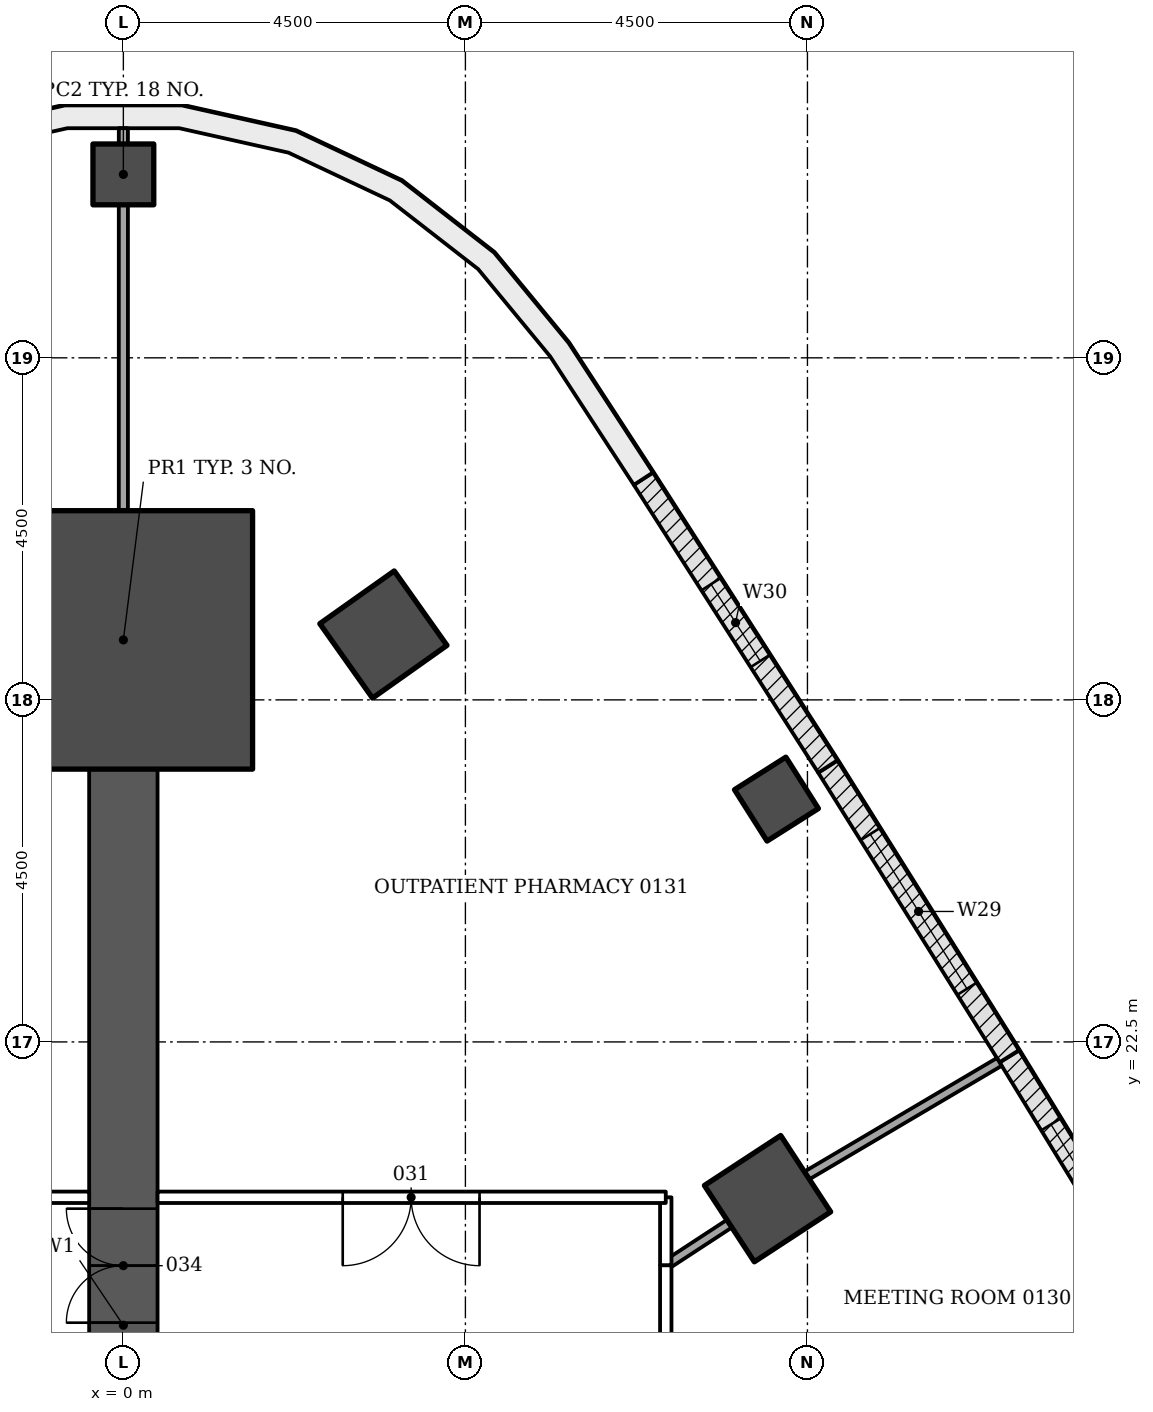
"""IFC4 building model, lengths in metres.
Left out: names, types, materials, properties, quantities, classifications, styles, units other than length and angle.
Written with IfcOpenShell. Run it as: python <this file> out.ifc"""

import sys

from ifc_helpers import new_model, si_unit, direction, frame, frame_2d, origin, origin_2d, place, context, subcontext, project, spatial, polyline, rectangle, outline, extrude, element, fill, save


model = new_model("IFC4")
c1 = context("Model", 3, precision=1e-05, world=origin(), true_north=direction((0.0, 1.0)))
c2 = subcontext(c1, "Body", "Model", "MODEL_VIEW")
j1 = project(units=[si_unit("LENGTHUNIT", "METRE"), si_unit("PLANEANGLEUNIT", "RADIAN")], contexts=[c1])
p1 = place(None, origin())
s1 = spatial("IfcSite", under=j1, at=p1, CompositionType="ELEMENT")
p2 = place(p1, origin())
s2 = spatial("IfcBuilding", under=s1, at=p2, CompositionType="ELEMENT")
p3 = place(p2, frame((0.0, 0.0, 6.0)))
s3 = spatial("IfcBuildingStorey", under=s2, at=p3, CompositionType="ELEMENT", Elevation=6.0)
for number, where, z_axis, x_axis in (
    (1, (8.475, 20.438, -0.25), (0.0, 0.0, 1.0), (0.837, 0.547, 0.0)),
    (2, (3.421, 27.86, -0.25), (0.0, 0.0, 1.0), (0.816, 0.578, 0.0)),
):
    element("IfcColumn", number, at=place(p3, frame(where, z_axis=z_axis, x_axis=x_axis)), inside=s3, PredefinedType="COLUMN", context=c2, shape_type="SweptSolid", body=[
        extrude(rectangle(XDim=1.2, YDim=1.2, at=origin_2d()), origin(), (0.0, 0.0, 1.0), 4.5),
    ])
for number, where, z_axis, x_axis in (
    (3, (0.0, 33.913, -0.25), (0.0, 0.0, 1.0), (0.0, 1.0, 0.0)),
    (4, (8.592, 25.695, -0.25), (0.0, 0.0, 1.0), (0.845, 0.535, 0.0)),
):
    element("IfcColumn", number, at=place(p3, frame(where, z_axis=z_axis, x_axis=x_axis)), inside=s3, PredefinedType="COLUMN", context=c2, shape_type="SweptSolid", body=[
        extrude(rectangle(XDim=0.8, YDim=0.8, at=origin_2d()), origin(), (0.0, 0.0, 1.0), 4.5),
    ])
p4 = place(p3, frame((0.0, 11.456, -0.25), z_axis=(0.0, 0.0, 1.0), x_axis=(0.0, 1.0, 0.0)))
e5 = element("IfcWall", 5, at=p4, inside=s3, PredefinedType="SHEAR", context=c2, shape_type="SweptSolid", body=[
    extrude(rectangle(XDim=14.633, YDim=0.9, at=frame_2d((7.316, 0.0))), origin(), (0.0, 0.0, 1.0), 4.5),
])
p5 = place(p4, frame((7.35, 0.0, 0.25)))
e6 = element("IfcOpeningElement", 6, at=p5, cuts=e5, PredefinedType="OPENING", context=c2, shape_type="SweptSolid", body=[
    extrude(rectangle(XDim=1.5, YDim=2.1, at=frame_2d((0.75, 1.05))), frame((0.0, 0.46, 0.0), z_axis=(0.0, -1.0, 0.0), x_axis=(1.0, 0.0, 0.0)), (0.0, 0.0, 1.0), 0.92),
])
p6 = place(p3, frame((0.0, 27.789, -0.25), z_axis=(0.0, 0.0, 1.0), x_axis=(0.0, 1.0, 0.0)))
e7 = element("IfcColumn", 7, at=p6, inside=s3, PredefinedType="COLUMN", context=c2, shape_type="SweptSolid", body=[
    extrude(rectangle(XDim=3.4, YDim=3.4, at=origin_2d()), origin(), (0.0, 0.0, 1.0), 4.5),
])
p7 = place(p3, frame((11.656, 22.309, 0.0), z_axis=(0.0, 0.0, 1.0), x_axis=(0.522078085402, -0.852897691838, 0.0)))
e8 = element("IfcWall", 8, at=p7, inside=s3, PredefinedType="NOTDEFINED", context=c2, shape_type="SweptSolid", body=[
    extrude(rectangle(XDim=4.496, YDim=0.3, at=frame_2d((2.248, 0.0))), origin(), (0.0, 0.0, 1.0), 4.25),
])
p8 = place(p7, frame((1.048, 0.0, 0.9)))
e9 = element("IfcOpeningElement", 9, at=p8, cuts=e8, PredefinedType="OPENING", context=c2, shape_type="SweptSolid", body=[
    extrude(rectangle(XDim=2.4, YDim=2.4, at=frame_2d((1.2, 1.2))), frame((0.0, 0.16, 0.0), z_axis=(0.0, -1.0, 0.0), x_axis=(1.0, 0.0, 0.0)), (0.0, 0.0, 1.0), 0.32),
])
p9 = place(p3, frame((9.269, 26.122, 0.0), z_axis=(0.0, 0.0, 1.0), x_axis=(0.530804082031, -0.847494558389, 0.0)))
e10 = element("IfcWall", 10, at=p9, inside=s3, PredefinedType="NOTDEFINED", context=c2, shape_type="SweptSolid", body=[
    extrude(rectangle(XDim=4.496, YDim=0.3, at=frame_2d((2.248, 0.0))), origin(), (0.0, 0.0, 1.0), 4.25),
])
p10 = place(p9, frame((1.048, 0.0, 0.9)))
e11 = element("IfcOpeningElement", 11, at=p10, cuts=e10, PredefinedType="OPENING", context=c2, shape_type="SweptSolid", body=[
    extrude(rectangle(XDim=2.4, YDim=2.4, at=frame_2d((1.2, 1.2))), frame((0.0, 0.16, 0.0), z_axis=(0.0, -1.0, 0.0), x_axis=(1.0, 0.0, 0.0)), (0.0, 0.0, 1.0), 0.32),
])
p11 = place(p3, frame((6.842, 29.909, 0.0), z_axis=(0.0, 0.0, 1.0), x_axis=(0.539483537275, -0.841996147859, 0.0)))
e12 = element("IfcWall", 12, at=p11, inside=s3, PredefinedType="NOTDEFINED", context=c2, shape_type="SweptSolid", body=[
    extrude(rectangle(XDim=4.496, YDim=0.3, at=frame_2d((2.248, 0.0))), origin(), (0.0, 0.0, 1.0), 4.25),
])
p12 = place(p11, frame((1.648, 0.0, 0.8)))
e13 = element("IfcOpeningElement", 13, at=p12, cuts=e12, PredefinedType="OPENING", context=c2, shape_type="SweptSolid", body=[
    extrude(rectangle(XDim=1.2, YDim=3.0, at=frame_2d((0.6, 1.5))), frame((0.0, 0.16, 0.0), z_axis=(0.0, -1.0, 0.0), x_axis=(1.0, 0.0, 0.0)), (0.0, 0.0, 1.0), 0.32),
])
p13 = place(p3, origin())
e14 = element("IfcWall", 14, at=p13, inside=s3, PredefinedType="NOTDEFINED", context=c2, shape_type="SweptSolid", body=[
    extrude(outline(polyline([(6.967, 29.992), (5.857, 31.697), (4.878, 32.884), (3.663, 33.828), (2.271, 34.485), (0.769, 34.821), (-0.769, 34.821), (-2.271, 34.485), (-3.663, 33.828), (-4.878, 32.884), (-5.857, 31.697), (-6.967, 29.992), (-6.716, 29.828), (-5.615, 31.519), (-4.667, 32.667), (-3.505, 33.571), (-2.173, 34.199), (-0.736, 34.521), (0.736, 34.521), (2.173, 34.199), (3.505, 33.571), (4.667, 32.667), (5.615, 31.519), (6.716, 29.828), (6.967, 29.992)])), origin(), (0.0, 0.0, 1.0), 4.25),
])
p14 = place(p3, frame((7.136, 14.297, 0.0), z_axis=(0.0, 0.0, 1.0), x_axis=(0.0, 1.0, 0.0)))
e15 = element("IfcWall", 15, at=p14, inside=s3, PredefinedType="PARTITIONING", context=c2, shape_type="SweptSolid", body=[
    extrude(rectangle(XDim=5.265, YDim=0.15, at=frame_2d((2.632, 0.0))), origin(), (0.0, 0.0, 1.0), 3.638),
])
p15 = place(p14, frame((2.15, 0.0, 0.0)))
e16 = element("IfcOpeningElement", 16, at=p15, cuts=e15, PredefinedType="OPENING", context=c2, shape_type="SweptSolid", body=[
    extrude(rectangle(XDim=1.0, YDim=2.1, at=frame_2d((0.5, 1.05))), frame((0.0, 0.085, 0.0), z_axis=(0.0, -1.0, 0.0), x_axis=(1.0, 0.0, 0.0)), (0.0, 0.0, 1.0), 0.17),
])
p16 = place(p3, frame((7.136, 19.563, 0.0), z_axis=(0.0, 0.0, 1.0), x_axis=(0.0, 1.0, 0.0)))
e17 = element("IfcWall", 17, at=p16, inside=s3, PredefinedType="PARTITIONING", context=c2, shape_type="SweptSolid", body=[
    extrude(rectangle(XDim=0.893, YDim=0.15, at=frame_2d((0.447, 0.0))), origin(), (0.0, 0.0, 1.0), 3.638),
])
p17 = place(p3, frame((7.136, 20.456, 0.0), z_axis=(0.0, 0.0, 1.0), x_axis=(-1.0, 0.0, 0.0)))
e18 = element("IfcWall", 18, at=p17, inside=s3, PredefinedType="PARTITIONING", context=c2, shape_type="SweptSolid", body=[
    extrude(rectangle(XDim=6.686, YDim=0.15, at=frame_2d((3.343, 0.0))), origin(), (0.0, 0.0, 1.0), 3.638),
])
p18 = place(p17, frame((2.45, 0.0, 0.0)))
e19 = element("IfcOpeningElement", 19, at=p18, cuts=e18, PredefinedType="OPENING", context=c2, shape_type="SweptSolid", body=[
    extrude(rectangle(XDim=1.8, YDim=2.1, at=frame_2d((0.9, 1.05))), frame((0.0, 0.085, 0.0), z_axis=(0.0, -1.0, 0.0), x_axis=(1.0, 0.0, 0.0)), (0.0, 0.0, 1.0), 0.17),
])
p19 = place(p3, frame((-0.45, 20.456, 0.0), z_axis=(0.0, 0.0, 1.0), x_axis=(-1.0, 0.0, 0.0)))
e20 = element("IfcWall", 20, at=p19, inside=s3, PredefinedType="PARTITIONING", context=c2, shape_type="SweptSolid", body=[
    extrude(rectangle(XDim=1.8, YDim=0.15, at=frame_2d((0.9, 0.0))), origin(), (0.0, 0.0, 1.0), 3.638),
])
p20 = place(p3, frame((7.973, 20.109, 0.0), z_axis=(0.0, 0.0, 1.0), x_axis=(-0.836986858992, -0.547222987341, 0.0)))
e21 = element("IfcWall", 21, at=p20, inside=s3, PredefinedType="PARTITIONING", context=c2, shape_type="SweptSolid", body=[
    extrude(rectangle(XDim=0.998, YDim=0.12, at=frame_2d((0.499, 0.0))), origin(), (0.0, 0.0, 1.0), 3.638),
])
p21 = place(p3, frame((11.524, 22.237, 0.0), z_axis=(0.0, 0.0, 1.0), x_axis=(-0.861228913487, -0.508217235613, 0.0)))
e22 = element("IfcWall", 22, at=p21, inside=s3, PredefinedType="PARTITIONING", context=c2, shape_type="SweptSolid", body=[
    extrude(rectangle(XDim=2.94, YDim=0.12, at=frame_2d((1.47, 0.0))), origin(), (0.0, 0.0, 1.0), 3.633),
])
p22 = place(p3, frame((0.0, 29.489, 0.0), z_axis=(0.0, 0.0, 1.0), x_axis=(0.0, 1.0, 0.0)))
e23 = element("IfcWall", 23, at=p22, inside=s3, PredefinedType="PARTITIONING", context=c2, shape_type="SweptSolid", body=[
    extrude(rectangle(XDim=4.024, YDim=0.12, at=frame_2d((2.012, 0.0))), origin(), (0.0, 0.0, 1.0), 3.717),
])
p23 = place(p3, frame((0.0, 34.313, 0.0), z_axis=(0.0, 0.0, 1.0), x_axis=(0.0, 1.0, 0.0)))
e24 = element("IfcWall", 24, at=p23, inside=s3, PredefinedType="PARTITIONING", context=c2, shape_type="SweptSolid", body=[
    extrude(rectangle(XDim=0.208, YDim=0.12, at=frame_2d((0.104, 0.0))), origin(), (0.0, 0.0, 1.0), 4.25),
])
p24 = place(p8, origin())
e25 = element("IfcWindow", 25, at=p24, inside=s3, PartitioningType="DOUBLE_PANEL_VERTICAL", PredefinedType="WINDOW", context=c2, shape_type="SweptSolid", body=[
    extrude(rectangle(XDim=2.4, YDim=2.4, at=frame_2d((1.2, 1.2))), frame((0.0, 0.03, 0.0), z_axis=(0.0, -1.0, 0.0), x_axis=(1.0, 0.0, 0.0)), (0.0, 0.0, 1.0), 0.06),
])
fill(e9, e25)
p25 = place(p10, origin())
e26 = element("IfcWindow", 26, at=p25, inside=s3, PartitioningType="DOUBLE_PANEL_VERTICAL", PredefinedType="WINDOW", context=c2, shape_type="SweptSolid", body=[
    extrude(rectangle(XDim=2.4, YDim=2.4, at=frame_2d((1.2, 1.2))), frame((0.0, 0.03, 0.0), z_axis=(0.0, -1.0, 0.0), x_axis=(1.0, 0.0, 0.0)), (0.0, 0.0, 1.0), 0.06),
])
fill(e11, e26)
p26 = place(p12, origin())
e27 = element("IfcWindow", 27, at=p26, inside=s3, PartitioningType="SINGLE_PANEL", PredefinedType="WINDOW", context=c2, shape_type="SweptSolid", body=[
    extrude(rectangle(XDim=1.2, YDim=3.0, at=frame_2d((0.6, 1.5))), frame((0.0, 0.03, 0.0), z_axis=(0.0, -1.0, 0.0), x_axis=(1.0, 0.0, 0.0)), (0.0, 0.0, 1.0), 0.06),
])
fill(e13, e27)
p27 = place(p18, origin())
e28 = element("IfcDoor", 28, at=p27, inside=s3, OperationType="DOUBLE_DOOR_SINGLE_SWING", PredefinedType="DOOR", context=c2, shape_type="SweptSolid", body=[
    extrude(rectangle(XDim=1.8, YDim=2.1, at=frame_2d((0.9, 1.05))), frame((0.0, 0.025, 0.0), z_axis=(0.0, -1.0, 0.0), x_axis=(1.0, 0.0, 0.0)), (0.0, 0.0, 1.0), 0.05),
])
fill(e19, e28)
p28 = place(p5, origin())
e29 = element("IfcDoor", 29, at=p28, inside=s3, OperationType="DOUBLE_DOOR_SINGLE_SWING", PredefinedType="DOOR", context=c2, shape_type="SweptSolid", body=[
    extrude(rectangle(XDim=1.5, YDim=2.1, at=frame_2d((0.75, 1.05))), frame((0.0, 0.025, 0.0), z_axis=(0.0, -1.0, 0.0), x_axis=(1.0, 0.0, 0.0)), (0.0, 0.0, 1.0), 0.05),
])
fill(e6, e29)
save(model, sys.argv[1])
